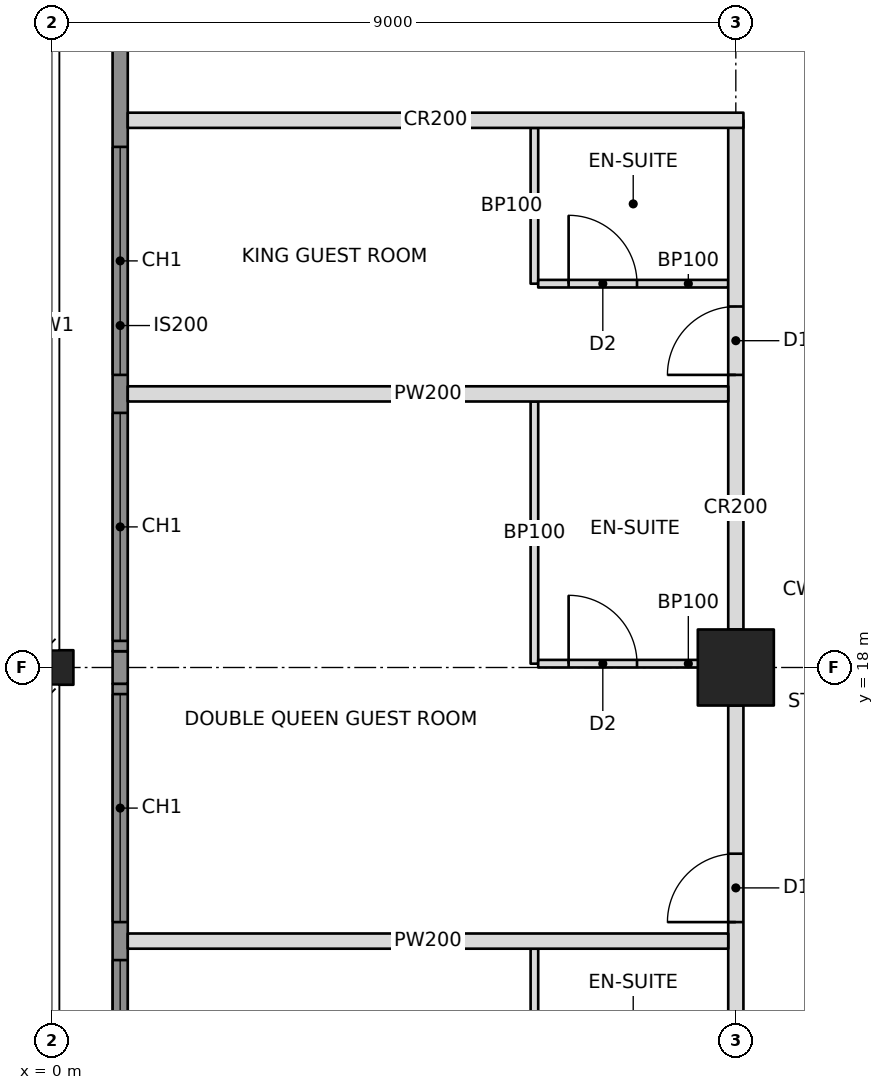
"""IFC4 building model, lengths in metres.
Left out: names, types, materials, properties, quantities, classifications, styles, units other than length and angle.
Written with IfcOpenShell. Run it as: python <this file> out.ifc"""

import sys

from ifc_helpers import new_model, si_unit, direction, frame, frame_2d, origin, origin_2d, place, context, subcontext, project, spatial, rectangle, hollow_rectangle, i_section, extrude, element, fill, save


model = new_model("IFC4")
c1 = context("Model", 3, precision=1e-05, world=origin(), true_north=direction((0.0, 1.0)))
c2 = subcontext(c1, "Body", "Model", "MODEL_VIEW")
j1 = project(units=[si_unit("LENGTHUNIT", "METRE"), si_unit("PLANEANGLEUNIT", "RADIAN")], contexts=[c1])
p1 = place(None, origin())
s1 = spatial("IfcSite", under=j1, at=p1, CompositionType="ELEMENT")
p2 = place(p1, origin())
s2 = spatial("IfcBuilding", under=s1, at=p2, CompositionType="ELEMENT")
p3 = place(p2, frame((0.0, 0.0, 85.8)))
s3 = spatial("IfcBuildingStorey", under=s2, at=p3, CompositionType="ELEMENT", Elevation=85.8)
p4 = place(p3, frame((0.0, 18.0, 0.0), z_axis=(0.0, 0.0, 1.0), x_axis=(0.0, 1.0, 0.0)))
e1 = element("IfcColumn", 1, at=p4, inside=s3, PredefinedType="COLUMN", context=c2, shape_type="SweptSolid", body=[
    extrude(i_section(OverallWidth=0.455, OverallDepth=0.569, WebThickness=0.078, FlangeThickness=0.125, at=origin_2d()), origin(), (0.0, 0.0, 1.0), 3.4),
])
p5 = place(p3, frame((9.0, 18.0, 0.0), z_axis=(0.0, 0.0, 1.0), x_axis=(1.0, 0.0, 0.0)))
e2 = element("IfcColumn", 2, at=p5, inside=s3, PredefinedType="COLUMN", context=c2, shape_type="SweptSolid", body=[
    extrude(hollow_rectangle(XDim=1.0, YDim=1.0, WallThickness=0.1, at=origin_2d()), origin(), (0.0, 0.0, 1.0), 3.4),
])
p6 = place(p3, frame((9.0, 10.8, 0.0), z_axis=(0.0, 0.0, 1.0), x_axis=(0.0, 1.0, 0.0)))
e3 = element("IfcWall", 3, at=p6, inside=s3, PredefinedType="PARTITIONING", context=c2, shape_type="SweptSolid", body=[
    extrude(rectangle(XDim=6.7, YDim=0.2, at=frame_2d((3.35, 0.0))), origin(), (0.0, 0.0, 1.0), 2.21),
])
p7 = place(p6, frame((0.25, 0.0, 0.0)))
e4 = element("IfcOpeningElement", 4, at=p7, cuts=e3, PredefinedType="OPENING", context=c2, shape_type="SweptSolid", body=[
    extrude(rectangle(XDim=0.9, YDim=2.1, at=frame_2d((0.45, 1.05))), frame((0.0, 0.11, 0.0), z_axis=(0.0, -1.0, 0.0), x_axis=(1.0, 0.0, 0.0)), (0.0, 0.0, 1.0), 0.22),
])
p8 = place(p6, frame((3.85, 0.0, 0.0)))
e5 = element("IfcOpeningElement", 5, at=p8, cuts=e3, PredefinedType="OPENING", context=c2, shape_type="SweptSolid", body=[
    extrude(rectangle(XDim=0.9, YDim=2.1, at=frame_2d((0.45, 1.05))), frame((0.0, 0.11, 0.0), z_axis=(0.0, -1.0, 0.0), x_axis=(1.0, 0.0, 0.0)), (0.0, 0.0, 1.0), 0.22),
])
p9 = place(p3, frame((9.0, 18.5, 0.0), z_axis=(0.0, 0.0, 1.0), x_axis=(0.0, 1.0, 0.0)))
e6 = element("IfcWall", 6, at=p9, inside=s3, PredefinedType="PARTITIONING", context=c2, shape_type="SweptSolid", body=[
    extrude(rectangle(XDim=6.7, YDim=0.2, at=frame_2d((3.35, 0.0))), origin(), (0.0, 0.0, 1.0), 2.21),
])
p10 = place(p9, frame((3.35, 0.0, 0.0)))
e7 = element("IfcOpeningElement", 7, at=p10, cuts=e6, PredefinedType="OPENING", context=c2, shape_type="SweptSolid", body=[
    extrude(rectangle(XDim=0.9, YDim=2.1, at=frame_2d((0.45, 1.05))), frame((0.0, 0.11, 0.0), z_axis=(0.0, -1.0, 0.0), x_axis=(1.0, 0.0, 0.0)), (0.0, 0.0, 1.0), 0.22),
])
p11 = place(p3, frame((1.0, 25.2, 0.0), z_axis=(0.0, 0.0, 1.0), x_axis=(1.0, 0.0, 0.0)))
e8 = element("IfcWall", 8, at=p11, inside=s3, PredefinedType="PARTITIONING", context=c2, shape_type="SweptSolid", body=[
    extrude(rectangle(XDim=8.1, YDim=0.2, at=frame_2d((4.05, 0.0))), origin(), (0.0, 0.0, 1.0), 2.21),
])
for number, where, z_axis, x_axis in (
    (9, (8.9, 14.4, 0.0), (0.0, 0.0, 1.0), (-1.0, 0.0, 0.0)),
    (10, (8.9, 21.6, 0.0), (0.0, 0.0, 1.0), (-1.0, 0.0, 0.0)),
):
    element("IfcWall", number, at=place(p3, frame(where, z_axis=z_axis, x_axis=x_axis)), inside=s3, PredefinedType="PARTITIONING", context=c2, shape_type="SweptSolid", body=[
        extrude(rectangle(XDim=7.9, YDim=0.2, at=frame_2d((3.95, 0.0))), origin(), (0.0, 0.0, 1.0), 2.21),
    ])
p12 = place(p3, frame((6.35, 12.25, 0.0), z_axis=(0.0, 0.0, 1.0), x_axis=(0.0, 1.0, 0.0)))
e11 = element("IfcWall", 11, at=p12, inside=s3, PredefinedType="PARTITIONING", context=c2, shape_type="SweptSolid", body=[
    extrude(rectangle(XDim=2.05, YDim=0.1, at=frame_2d((1.025, 0.0))), origin(), (0.0, 0.0, 1.0), 3.15),
])
p13 = place(p3, frame((6.35, 18.05, 0.0), z_axis=(0.0, 0.0, 1.0), x_axis=(0.0, 1.0, 0.0)))
e12 = element("IfcWall", 12, at=p13, inside=s3, PredefinedType="PARTITIONING", context=c2, shape_type="SweptSolid", body=[
    extrude(rectangle(XDim=3.45, YDim=0.1, at=frame_2d((1.725, 0.0))), origin(), (0.0, 0.0, 1.0), 2.202),
])
p14 = place(p3, frame((8.9, 18.05, 0.0), z_axis=(0.0, 0.0, 1.0), x_axis=(-1.0, 0.0, 0.0)))
e13 = element("IfcWall", 13, at=p14, inside=s3, PredefinedType="PARTITIONING", context=c2, shape_type="SweptSolid", body=[
    extrude(rectangle(XDim=2.5, YDim=0.1, at=frame_2d((1.25, 0.0))), origin(), (0.0, 0.0, 1.0), 2.203),
])
p15 = place(p14, frame((1.2, 0.0, 0.0)))
e14 = element("IfcOpeningElement", 14, at=p15, cuts=e13, PredefinedType="OPENING", context=c2, shape_type="SweptSolid", body=[
    extrude(rectangle(XDim=0.9, YDim=2.1, at=frame_2d((0.45, 1.05))), frame((0.0, 0.06, 0.0), z_axis=(0.0, -1.0, 0.0), x_axis=(1.0, 0.0, 0.0)), (0.0, 0.0, 1.0), 0.12),
])
p16 = place(p3, frame((6.35, 23.05, 0.0), z_axis=(0.0, 0.0, 1.0), x_axis=(0.0, 1.0, 0.0)))
e15 = element("IfcWall", 15, at=p16, inside=s3, PredefinedType="PARTITIONING", context=c2, shape_type="SweptSolid", body=[
    extrude(rectangle(XDim=2.05, YDim=0.1, at=frame_2d((1.025, 0.0))), origin(), (0.0, 0.0, 1.0), 3.15),
])
p17 = place(p3, frame((8.9, 23.05, 0.0), z_axis=(0.0, 0.0, 1.0), x_axis=(-1.0, 0.0, 0.0)))
e16 = element("IfcWall", 16, at=p17, inside=s3, PredefinedType="PARTITIONING", context=c2, shape_type="SweptSolid", body=[
    extrude(rectangle(XDim=2.5, YDim=0.1, at=frame_2d((1.25, 0.0))), origin(), (0.0, 0.0, 1.0), 2.21),
])
p18 = place(p17, frame((1.2, 0.0, 0.0)))
e17 = element("IfcOpeningElement", 17, at=p18, cuts=e16, PredefinedType="OPENING", context=c2, shape_type="SweptSolid", body=[
    extrude(rectangle(XDim=0.9, YDim=2.1, at=frame_2d((0.45, 1.05))), frame((0.0, 0.06, 0.0), z_axis=(0.0, -1.0, 0.0), x_axis=(1.0, 0.0, 0.0)), (0.0, 0.0, 1.0), 0.12),
])
p19 = place(p3, frame((0.9, 9.215, 0.0), z_axis=(0.0, 0.0, 1.0), x_axis=(0.0, 1.0, 0.0)))
e18 = element("IfcWall", 18, at=p19, inside=s3, PredefinedType="SOLIDWALL", context=c2, shape_type="SweptSolid", body=[
    extrude(rectangle(XDim=8.571, YDim=0.2, at=frame_2d((4.285, 0.0))), origin(), (0.0, 0.0, 1.0), 3.15),
])
p20 = place(p19, frame((1.935, 0.0, 0.6)))
e19 = element("IfcOpeningElement", 19, at=p20, cuts=e18, PredefinedType="OPENING", context=c2, shape_type="SweptSolid", body=[
    extrude(rectangle(XDim=3.0, YDim=2.2, at=frame_2d((1.5, 1.1))), frame((0.0, 0.11, 0.0), z_axis=(0.0, -1.0, 0.0), x_axis=(1.0, 0.0, 0.0)), (0.0, 0.0, 1.0), 0.22),
])
p21 = place(p19, frame((5.435, 0.0, 0.6)))
e20 = element("IfcOpeningElement", 20, at=p21, cuts=e18, PredefinedType="OPENING", context=c2, shape_type="SweptSolid", body=[
    extrude(rectangle(XDim=3.0, YDim=2.2, at=frame_2d((1.5, 1.1))), frame((0.0, 0.11, 0.0), z_axis=(0.0, -1.0, 0.0), x_axis=(1.0, 0.0, 0.0)), (0.0, 0.0, 1.0), 0.22),
])
p22 = place(p3, frame((0.9, 17.786, 0.0), z_axis=(0.0, 0.0, 1.0), x_axis=(0.0, 1.0, 0.0)))
e21 = element("IfcWall", 21, at=p22, inside=s3, PredefinedType="SOLIDWALL", context=c2, shape_type="SweptSolid", body=[
    extrude(rectangle(XDim=0.428, YDim=0.2, at=frame_2d((0.214, 0.0))), origin(), (0.0, 0.0, 1.0), 2.202),
])
p23 = place(p3, frame((0.9, 18.214, 0.0), z_axis=(0.0, 0.0, 1.0), x_axis=(0.0, 1.0, 0.0)))
e22 = element("IfcWall", 22, at=p23, inside=s3, PredefinedType="SOLIDWALL", context=c2, shape_type="SweptSolid", body=[
    extrude(rectangle(XDim=8.571, YDim=0.2, at=frame_2d((4.285, 0.0))), origin(), (0.0, 0.0, 1.0), 3.15),
])
p24 = place(p23, frame((0.136, 0.0, 0.6)))
e23 = element("IfcOpeningElement", 23, at=p24, cuts=e22, PredefinedType="OPENING", context=c2, shape_type="SweptSolid", body=[
    extrude(rectangle(XDim=3.0, YDim=2.2, at=frame_2d((1.5, 1.1))), frame((0.0, 0.11, 0.0), z_axis=(0.0, -1.0, 0.0), x_axis=(1.0, 0.0, 0.0)), (0.0, 0.0, 1.0), 0.22),
])
p25 = place(p23, frame((3.636, 0.0, 0.6)))
e24 = element("IfcOpeningElement", 24, at=p25, cuts=e22, PredefinedType="OPENING", context=c2, shape_type="SweptSolid", body=[
    extrude(rectangle(XDim=3.0, YDim=2.2, at=frame_2d((1.5, 1.1))), frame((0.0, 0.11, 0.0), z_axis=(0.0, -1.0, 0.0), x_axis=(1.0, 0.0, 0.0)), (0.0, 0.0, 1.0), 0.22),
])
p26 = place(p20, origin())
e25 = element("IfcWindow", 25, at=p26, inside=s3, PartitioningType="TRIPLE_PANEL_VERTICAL", PredefinedType="WINDOW", context=c2, shape_type="SweptSolid", body=[
    extrude(rectangle(XDim=3.0, YDim=2.2, at=frame_2d((1.5, 1.1))), frame((0.0, 0.03, 0.0), z_axis=(0.0, -1.0, 0.0), x_axis=(1.0, 0.0, 0.0)), (0.0, 0.0, 1.0), 0.06),
])
fill(e19, e25)
p27 = place(p21, origin())
e26 = element("IfcWindow", 26, at=p27, inside=s3, PartitioningType="TRIPLE_PANEL_VERTICAL", PredefinedType="WINDOW", context=c2, shape_type="SweptSolid", body=[
    extrude(rectangle(XDim=3.0, YDim=2.2, at=frame_2d((1.5, 1.1))), frame((0.0, 0.03, 0.0), z_axis=(0.0, -1.0, 0.0), x_axis=(1.0, 0.0, 0.0)), (0.0, 0.0, 1.0), 0.06),
])
fill(e20, e26)
p28 = place(p24, origin())
e27 = element("IfcWindow", 27, at=p28, inside=s3, PartitioningType="TRIPLE_PANEL_VERTICAL", PredefinedType="WINDOW", context=c2, shape_type="SweptSolid", body=[
    extrude(rectangle(XDim=3.0, YDim=2.2, at=frame_2d((1.5, 1.1))), frame((0.0, 0.03, 0.0), z_axis=(0.0, -1.0, 0.0), x_axis=(1.0, 0.0, 0.0)), (0.0, 0.0, 1.0), 0.06),
])
fill(e23, e27)
p29 = place(p25, origin())
e28 = element("IfcWindow", 28, at=p29, inside=s3, PartitioningType="TRIPLE_PANEL_VERTICAL", PredefinedType="WINDOW", context=c2, shape_type="SweptSolid", body=[
    extrude(rectangle(XDim=3.0, YDim=2.2, at=frame_2d((1.5, 1.1))), frame((0.0, 0.03, 0.0), z_axis=(0.0, -1.0, 0.0), x_axis=(1.0, 0.0, 0.0)), (0.0, 0.0, 1.0), 0.06),
])
fill(e24, e28)
p30 = place(p15, frame((0.9, 0.0, 0.0), z_axis=(0.0, 0.0, 1.0), x_axis=(-1.0, 0.0, 0.0)))
e29 = element("IfcDoor", 29, at=p30, inside=s3, OperationType="SINGLE_SWING_LEFT", PredefinedType="DOOR", context=c2, shape_type="SweptSolid", body=[
    extrude(rectangle(XDim=0.9, YDim=2.1, at=frame_2d((0.45, 1.05))), frame((0.0, 0.025, 0.0), z_axis=(0.0, -1.0, 0.0), x_axis=(1.0, 0.0, 0.0)), (0.0, 0.0, 1.0), 0.05),
])
fill(e14, e29)
p31 = place(p8, origin())
e30 = element("IfcDoor", 30, at=p31, inside=s3, OperationType="SINGLE_SWING_LEFT", PredefinedType="DOOR", context=c2, shape_type="SweptSolid", body=[
    extrude(rectangle(XDim=0.9, YDim=2.1, at=frame_2d((0.45, 1.05))), frame((0.0, 0.025, 0.0), z_axis=(0.0, -1.0, 0.0), x_axis=(1.0, 0.0, 0.0)), (0.0, 0.0, 1.0), 0.05),
])
fill(e5, e30)
p32 = place(p18, frame((0.9, 0.0, 0.0), z_axis=(0.0, 0.0, 1.0), x_axis=(-1.0, 0.0, 0.0)))
e31 = element("IfcDoor", 31, at=p32, inside=s3, OperationType="SINGLE_SWING_LEFT", PredefinedType="DOOR", context=c2, shape_type="SweptSolid", body=[
    extrude(rectangle(XDim=0.9, YDim=2.1, at=frame_2d((0.45, 1.05))), frame((0.0, 0.025, 0.0), z_axis=(0.0, -1.0, 0.0), x_axis=(1.0, 0.0, 0.0)), (0.0, 0.0, 1.0), 0.05),
])
fill(e17, e31)
p33 = place(p10, origin())
e32 = element("IfcDoor", 32, at=p33, inside=s3, OperationType="SINGLE_SWING_LEFT", PredefinedType="DOOR", context=c2, shape_type="SweptSolid", body=[
    extrude(rectangle(XDim=0.9, YDim=2.1, at=frame_2d((0.45, 1.05))), frame((0.0, 0.025, 0.0), z_axis=(0.0, -1.0, 0.0), x_axis=(1.0, 0.0, 0.0)), (0.0, 0.0, 1.0), 0.05),
])
fill(e7, e32)
save(model, sys.argv[1])
